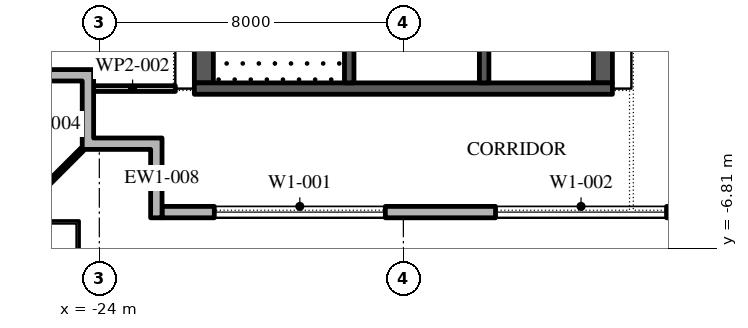
"""IFC4 building model, lengths in metres.
Left out: names, types, materials, properties, quantities, classifications, styles, units other than length and angle.
Written with IfcOpenShell. Run it as: python <this file> out.ifc"""

import sys

from ifc_helpers import new_model, si_unit, direction, frame, frame_2d, origin, place, context, subcontext, project, spatial, polyline, rectangle, outline, extrude, element, fill, save


model = new_model("IFC4")
c1 = context("Model", 3, precision=1e-05, world=origin(), true_north=direction((0.0, 1.0)))
c2 = subcontext(c1, "Body", "Model", "MODEL_VIEW")
j1 = project(units=[si_unit("LENGTHUNIT", "METRE"), si_unit("PLANEANGLEUNIT", "RADIAN")], contexts=[c1])
p1 = place(None, origin())
s1 = spatial("IfcSite", under=j1, at=p1, CompositionType="ELEMENT")
p2 = place(p1, origin())
s2 = spatial("IfcBuilding", under=s1, at=p2, CompositionType="ELEMENT")
p3 = place(p2, frame((0.0, 0.0, 325.8)))
s3 = spatial("IfcBuildingStorey", under=s2, at=p3, CompositionType="ELEMENT", Elevation=325.8)
p4 = place(p3, frame((-22.35, -5.85, 0.0), z_axis=(0.0, 0.0, 1.0), x_axis=(1.0, 0.0, 0.0)))
e1 = element("IfcWall", 1, at=p4, inside=s3, PredefinedType="STANDARD", context=c2, shape_type="SweptSolid", body=[
    extrude(rectangle(XDim=45.0, YDim=0.3, at=frame_2d((22.5, 0.0))), origin(), (0.0, 0.0, 1.0), 4.0),
])
p5 = place(p4, frame((1.375, 0.0, 0.45)))
e2 = element("IfcOpeningElement", 2, at=p5, cuts=e1, PredefinedType="OPENING", context=c2, shape_type="SweptSolid", body=[
    extrude(rectangle(XDim=4.5, YDim=3.05, at=frame_2d((2.25, 1.525))), frame((0.0, 0.16, 0.0), z_axis=(0.0, -1.0, 0.0), x_axis=(1.0, 0.0, 0.0)), (0.0, 0.0, 1.0), 0.32),
])
p6 = place(p4, frame((8.775, 0.0, 0.45)))
e3 = element("IfcOpeningElement", 3, at=p6, cuts=e1, PredefinedType="OPENING", context=c2, shape_type="SweptSolid", body=[
    extrude(rectangle(XDim=4.5, YDim=3.05, at=frame_2d((2.25, 1.525))), frame((0.0, 0.16, 0.0), z_axis=(0.0, -1.0, 0.0), x_axis=(1.0, 0.0, 0.0)), (0.0, 0.0, 1.0), 0.32),
])
p7 = place(p4, frame((17.375, 0.0, 0.0)))
e4 = element("IfcOpeningElement", 4, at=p7, cuts=e1, PredefinedType="OPENING", context=c2, shape_type="SweptSolid", body=[
    extrude(rectangle(XDim=2.4, YDim=3.5, at=frame_2d((1.2, 1.75))), frame((0.0, 0.16, 0.0), z_axis=(0.0, -1.0, 0.0), x_axis=(1.0, 0.0, 0.0)), (0.0, 0.0, 1.0), 0.32),
])
p8 = place(p4, frame((23.875, 0.0, 0.45)))
e5 = element("IfcOpeningElement", 5, at=p8, cuts=e1, PredefinedType="OPENING", context=c2, shape_type="SweptSolid", body=[
    extrude(rectangle(XDim=4.5, YDim=3.05, at=frame_2d((2.25, 1.525))), frame((0.0, 0.16, 0.0), z_axis=(0.0, -1.0, 0.0), x_axis=(1.0, 0.0, 0.0)), (0.0, 0.0, 1.0), 0.32),
])
p9 = place(p4, frame((31.425, 0.0, 0.45)))
e6 = element("IfcOpeningElement", 6, at=p9, cuts=e1, PredefinedType="OPENING", context=c2, shape_type="SweptSolid", body=[
    extrude(rectangle(XDim=4.5, YDim=3.05, at=frame_2d((2.25, 1.525))), frame((0.0, 0.16, 0.0), z_axis=(0.0, -1.0, 0.0), x_axis=(1.0, 0.0, 0.0)), (0.0, 0.0, 1.0), 0.32),
])
p10 = place(p4, frame((38.975, 0.0, 0.45)))
e7 = element("IfcOpeningElement", 7, at=p10, cuts=e1, PredefinedType="OPENING", context=c2, shape_type="SweptSolid", body=[
    extrude(rectangle(XDim=4.5, YDim=3.05, at=frame_2d((2.25, 1.525))), frame((0.0, 0.16, 0.0), z_axis=(0.0, -1.0, 0.0), x_axis=(1.0, 0.0, 0.0)), (0.0, 0.0, 1.0), 0.32),
])
p11 = place(p3, origin())
e8 = element("IfcWall", 8, at=p11, inside=s3, PredefinedType="STANDARD", context=c2, shape_type="SweptSolid", body=[
    extrude(outline(polyline([(-22.65, -4.2), (-24.45, -4.2), (-24.45, -2.4), (-25.95, -2.4), (-25.95, -2.1), (-24.15, -2.1), (-24.15, -3.9), (-22.35, -3.9), (-22.35, -6.0), (-22.65, -6.0), (-22.65, -4.2)])), origin(), (0.0, 0.0, 1.0), 4.0),
])
p12 = place(p3, frame((-24.45, -4.2, -0.05), z_axis=(0.0, 0.0, 1.0), x_axis=(-0.707106781187, -0.707106781187, 0.0)))
e9 = element("IfcWall", 9, at=p12, inside=s3, PredefinedType="STANDARD", context=c2, shape_type="SweptSolid", body=[
    extrude(rectangle(XDim=2.667, YDim=0.1, at=frame_2d((1.333, 0.0))), origin(), (0.0, 0.0, 1.0), 4.05),
])
p13 = place(p3, frame((-21.25, -2.45, 0.0), z_axis=(0.0, 0.0, 1.0), x_axis=(0.0, 1.0, 0.0)))
e10 = element("IfcWall", 10, at=p13, inside=s3, PredefinedType="SHEAR", context=c2, shape_type="SweptSolid", body=[
    extrude(rectangle(XDim=27.9, YDim=0.5, at=frame_2d((13.95, 0.0))), origin(), (0.0, 0.0, 1.0), 4.0),
])
p14 = place(p13, frame((5.05, 0.0, 0.0)))
e11 = element("IfcOpeningElement", 11, at=p14, cuts=e10, PredefinedType="OPENING", context=c2, shape_type="SweptSolid", body=[
    extrude(rectangle(XDim=1.2, YDim=2.1, at=frame_2d((0.6, 1.05))), frame((0.0, 0.26, 0.0), z_axis=(0.0, -1.0, 0.0), x_axis=(1.0, 0.0, 0.0)), (0.0, 0.0, 1.0), 0.52),
])
p15 = place(p13, frame((21.65, 0.0, 0.0)))
e12 = element("IfcOpeningElement", 12, at=p15, cuts=e10, PredefinedType="OPENING", context=c2, shape_type="SweptSolid", body=[
    extrude(rectangle(XDim=1.2, YDim=2.1, at=frame_2d((0.6, 1.05))), frame((0.0, 0.26, 0.0), z_axis=(0.0, -1.0, 0.0), x_axis=(1.0, 0.0, 0.0)), (0.0, 0.0, 1.0), 0.52),
])
p16 = place(p3, frame((-10.75, -2.45, 0.0), z_axis=(0.0, 0.0, 1.0), x_axis=(0.0, 1.0, 0.0)))
e13 = element("IfcWall", 13, at=p16, inside=s3, PredefinedType="SHEAR", context=c2, shape_type="SweptSolid", body=[
    extrude(rectangle(XDim=27.9, YDim=0.5, at=frame_2d((13.95, 0.0))), origin(), (0.0, 0.0, 1.0), 4.0),
])
p17 = place(p16, frame((23.65, 0.0, 0.0)))
e14 = element("IfcOpeningElement", 14, at=p17, cuts=e13, PredefinedType="OPENING", context=c2, shape_type="SweptSolid", body=[
    extrude(rectangle(XDim=2.4, YDim=2.1, at=frame_2d((1.2, 1.05))), frame((0.0, 0.26, 0.0), z_axis=(0.0, -1.0, 0.0), x_axis=(1.0, 0.0, 0.0)), (0.0, 0.0, 1.0), 0.52),
])
p18 = place(p16, frame((1.387, 0.0, 0.0)))
e15 = element("IfcOpeningElement", 15, at=p18, cuts=e13, PredefinedType="OPENING", context=c2, shape_type="SweptSolid", body=[
    extrude(rectangle(XDim=0.9, YDim=2.1, at=frame_2d((0.45, 1.05))), frame((0.0, 0.26, 0.0), z_axis=(0.0, -1.0, 0.0), x_axis=(1.0, 0.0, 0.0)), (0.0, 0.0, 1.0), 0.52),
])
p19 = place(p16, frame((4.562, 0.0, 0.0)))
e16 = element("IfcOpeningElement", 16, at=p19, cuts=e13, PredefinedType="OPENING", context=c2, shape_type="SweptSolid", body=[
    extrude(rectangle(XDim=1.0, YDim=2.1, at=frame_2d((0.5, 1.05))), frame((0.0, 0.26, 0.0), z_axis=(0.0, -1.0, 0.0), x_axis=(1.0, 0.0, 0.0)), (0.0, 0.0, 1.0), 0.52),
])
p20 = place(p3, frame((-21.5, -2.6, 0.0), z_axis=(0.0, 0.0, 1.0), x_axis=(1.0, 0.0, 0.0)))
e17 = element("IfcWall", 17, at=p20, inside=s3, PredefinedType="SHEAR", context=c2, shape_type="SweptSolid", body=[
    extrude(rectangle(XDim=11.0, YDim=0.3, at=frame_2d((5.5, 0.0))), origin(), (0.0, 0.0, 1.0), 4.0),
])
p21 = place(p3, frame((-17.425, -2.45, 0.0), z_axis=(0.0, 0.0, 1.0), x_axis=(0.0, 1.0, 0.0)))
e18 = element("IfcWall", 18, at=p21, inside=s3, PredefinedType="SHEAR", context=c2, shape_type="SweptSolid", body=[
    extrude(rectangle(XDim=6.3, YDim=0.25, at=frame_2d((3.15, 0.0))), origin(), (0.0, 0.0, 1.0), 4.0),
])
p22 = place(p21, frame((5.05, 0.0, 0.0)))
e19 = element("IfcOpeningElement", 19, at=p22, cuts=e18, PredefinedType="OPENING", context=c2, shape_type="SweptSolid", body=[
    extrude(rectangle(XDim=1.2, YDim=2.1, at=frame_2d((0.6, 1.05))), frame((0.0, 0.135, 0.0), z_axis=(0.0, -1.0, 0.0), x_axis=(1.0, 0.0, 0.0)), (0.0, 0.0, 1.0), 0.27),
])
p23 = place(p3, frame((-13.875, -2.45, 0.0), z_axis=(0.0, 0.0, 1.0), x_axis=(0.0, 1.0, 0.0)))
e20 = element("IfcWall", 20, at=p23, inside=s3, PredefinedType="SHEAR", context=c2, shape_type="SweptSolid", body=[
    extrude(rectangle(XDim=21.3, YDim=0.25, at=frame_2d((10.65, 0.0))), origin(), (0.0, 0.0, 1.0), 4.0),
])
p24 = place(p23, frame((9.846, 0.0, 0.0)))
e21 = element("IfcOpeningElement", 21, at=p24, cuts=e20, PredefinedType="OPENING", context=c2, shape_type="SweptSolid", body=[
    extrude(rectangle(XDim=0.9, YDim=2.1, at=frame_2d((0.45, 1.05))), frame((0.0, 0.135, 0.0), z_axis=(0.0, -1.0, 0.0), x_axis=(1.0, 0.0, 0.0)), (0.0, 0.0, 1.0), 0.27),
])
p25 = place(p23, frame((12.911, 0.0, 0.0)))
e22 = element("IfcOpeningElement", 22, at=p25, cuts=e20, PredefinedType="OPENING", context=c2, shape_type="SweptSolid", body=[
    extrude(rectangle(XDim=0.9, YDim=2.1, at=frame_2d((0.45, 1.05))), frame((0.0, 0.135, 0.0), z_axis=(0.0, -1.0, 0.0), x_axis=(1.0, 0.0, 0.0)), (0.0, 0.0, 1.0), 0.27),
])
p26 = place(p23, frame((6.971, 0.0, 0.0)))
e23 = element("IfcOpeningElement", 23, at=p26, cuts=e20, PredefinedType="OPENING", context=c2, shape_type="SweptSolid", body=[
    extrude(rectangle(XDim=1.1, YDim=2.1, at=frame_2d((0.55, 1.05))), frame((0.0, 0.135, 0.0), z_axis=(0.0, -1.0, 0.0), x_axis=(1.0, 0.0, 0.0)), (0.0, 0.0, 1.0), 0.27),
])
p27 = place(p23, frame((15.543, 0.0, 0.0)))
e24 = element("IfcOpeningElement", 24, at=p27, cuts=e20, PredefinedType="OPENING", context=c2, shape_type="SweptSolid", body=[
    extrude(rectangle(XDim=1.1, YDim=2.1, at=frame_2d((0.55, 1.05))), frame((0.0, 0.135, 0.0), z_axis=(0.0, -1.0, 0.0), x_axis=(1.0, 0.0, 0.0)), (0.0, 0.0, 1.0), 0.27),
])
p28 = place(p23, frame((17.686, 0.0, 0.0)))
e25 = element("IfcOpeningElement", 25, at=p28, cuts=e20, PredefinedType="OPENING", context=c2, shape_type="SweptSolid", body=[
    extrude(rectangle(XDim=1.1, YDim=2.1, at=frame_2d((0.55, 1.05))), frame((0.0, 0.135, 0.0), z_axis=(0.0, -1.0, 0.0), x_axis=(1.0, 0.0, 0.0)), (0.0, 0.0, 1.0), 0.27),
])
p29 = place(p23, frame((19.829, 0.0, 0.0)))
e26 = element("IfcOpeningElement", 26, at=p29, cuts=e20, PredefinedType="OPENING", context=c2, shape_type="SweptSolid", body=[
    extrude(rectangle(XDim=1.1, YDim=2.1, at=frame_2d((0.55, 1.05))), frame((0.0, 0.135, 0.0), z_axis=(0.0, -1.0, 0.0), x_axis=(1.0, 0.0, 0.0)), (0.0, 0.0, 1.0), 0.27),
])
p30 = place(p3, frame((-24.25, -2.6, 0.0), z_axis=(0.0, 0.0, 1.0), x_axis=(1.0, 0.0, 0.0)))
e27 = element("IfcWall", 27, at=p30, inside=s3, PredefinedType="PARTITIONING", context=c2, shape_type="SweptSolid", body=[
    extrude(rectangle(XDim=2.25, YDim=0.15, at=frame_2d((1.125, 0.0))), origin(), (0.0, 0.0, 1.0), 4.0),
])
p31 = place(p5, origin())
e28 = element("IfcWindow", 28, at=p31, inside=s3, PartitioningType="DOUBLE_PANEL_VERTICAL", PredefinedType="WINDOW", context=c2, shape_type="SweptSolid", body=[
    extrude(rectangle(XDim=4.5, YDim=3.05, at=frame_2d((2.25, 1.525))), frame((0.0, 0.03, 0.0), z_axis=(0.0, -1.0, 0.0), x_axis=(1.0, 0.0, 0.0)), (0.0, 0.0, 1.0), 0.06),
])
fill(e2, e28)
p32 = place(p6, origin())
e29 = element("IfcWindow", 29, at=p32, inside=s3, PartitioningType="DOUBLE_PANEL_VERTICAL", PredefinedType="WINDOW", context=c2, shape_type="SweptSolid", body=[
    extrude(rectangle(XDim=4.5, YDim=3.05, at=frame_2d((2.25, 1.525))), frame((0.0, 0.03, 0.0), z_axis=(0.0, -1.0, 0.0), x_axis=(1.0, 0.0, 0.0)), (0.0, 0.0, 1.0), 0.06),
])
fill(e3, e29)
save(model, sys.argv[1])
